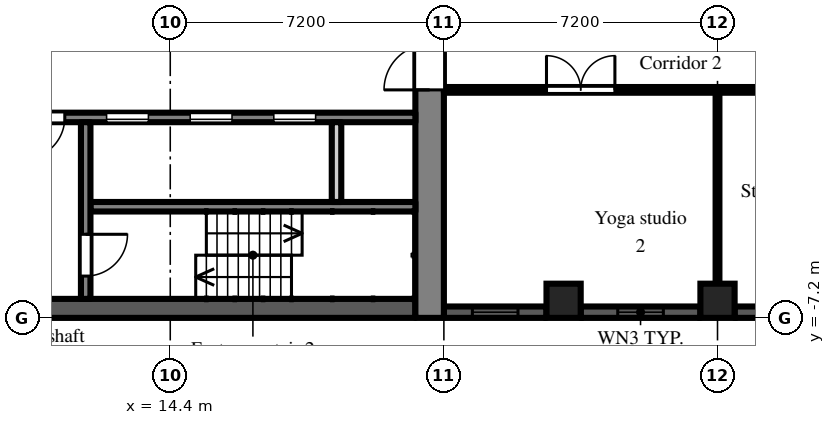
"""IFC4 building model, lengths in metres.
Left out: names, types, materials, properties, quantities, classifications, styles, units other than length and angle.
Written with IfcOpenShell. Run it as: python <this file> out.ifc"""

import sys

from ifc_helpers import new_model, si_unit, direction, frame, frame_2d, origin, origin_2d, place, context, subcontext, project, spatial, rectangle, extrude, element, fill, save


model = new_model("IFC4")
c1 = context("Model", 3, precision=1e-05, world=origin(), true_north=direction((0.0, 1.0)))
c2 = subcontext(c1, "Body", "Model", "MODEL_VIEW")
j1 = project(units=[si_unit("LENGTHUNIT", "METRE"), si_unit("PLANEANGLEUNIT", "RADIAN")], contexts=[c1])
p1 = place(None, origin())
s1 = spatial("IfcSite", under=j1, at=p1, CompositionType="ELEMENT")
p2 = place(p1, origin())
s2 = spatial("IfcBuilding", under=s1, at=p2, CompositionType="ELEMENT")
p3 = place(p2, frame((0.0, 0.0, 84.9)))
s3 = spatial("IfcBuildingStorey", under=s2, at=p3, CompositionType="ELEMENT", Elevation=84.9)
for number, where, z_axis, x_axis in (
    (1, (24.75, -6.75, 0.0), (0.0, 0.0, 1.0), (1.0, 0.0, 0.0)),
    (2, (28.8, -6.75, 0.0), (0.0, 0.0, 1.0), (1.0, 0.0, 0.0)),
):
    element("IfcColumn", number, at=place(p3, frame(where, z_axis=z_axis, x_axis=x_axis)), inside=s3, PredefinedType="COLUMN", context=c2, shape_type="SweptSolid", body=[
        extrude(rectangle(XDim=0.9, YDim=0.9, at=origin_2d()), origin(), (0.0, 0.0, 1.0), 3.0),
    ])
p4 = place(p3, frame((21.6, -7.05, 0.0), z_axis=(0.0, 0.0, 1.0), x_axis=(1.0, 0.0, 0.0)))
e3 = element("IfcWall", 3, at=p4, inside=s3, PredefinedType="SOLIDWALL", context=c2, shape_type="SweptSolid", body=[
    extrude(rectangle(XDim=2.7, YDim=0.3, at=frame_2d((1.35, 0.0))), origin(), (0.0, 0.0, 1.0), 2.1),
])
p5 = place(p4, frame((0.75, 0.0, 0.2)))
e4 = element("IfcOpeningElement", 4, at=p5, cuts=e3, PredefinedType="OPENING", context=c2, shape_type="SweptSolid", body=[
    extrude(rectangle(XDim=1.2, YDim=1.85, at=frame_2d((0.6, 0.925))), frame((0.0, 0.16, 0.0), z_axis=(0.0, -1.0, 0.0), x_axis=(1.0, 0.0, 0.0)), (0.0, 0.0, 1.0), 0.32),
])
p6 = place(p3, frame((25.2, -7.05, 0.0), z_axis=(0.0, 0.0, 1.0), x_axis=(1.0, 0.0, 0.0)))
e5 = element("IfcWall", 5, at=p6, inside=s3, PredefinedType="SOLIDWALL", context=c2, shape_type="SweptSolid", body=[
    extrude(rectangle(XDim=3.15, YDim=0.3, at=frame_2d((1.575, 0.0))), origin(), (0.0, 0.0, 1.0), 2.1),
])
p7 = place(p6, frame((0.975, 0.0, 0.2)))
e6 = element("IfcOpeningElement", 6, at=p7, cuts=e5, PredefinedType="OPENING", context=c2, shape_type="SweptSolid", body=[
    extrude(rectangle(XDim=1.2, YDim=1.85, at=frame_2d((0.6, 0.925))), frame((0.0, 0.16, 0.0), z_axis=(0.0, -1.0, 0.0), x_axis=(1.0, 0.0, 0.0)), (0.0, 0.0, 1.0), 0.32),
])
p8 = place(p3, frame((29.25, -7.05, 0.0), z_axis=(0.0, 0.0, 1.0), x_axis=(1.0, 0.0, 0.0)))
e7 = element("IfcWall", 7, at=p8, inside=s3, PredefinedType="SOLIDWALL", context=c2, shape_type="SweptSolid", body=[
    extrude(rectangle(XDim=6.3, YDim=0.3, at=frame_2d((3.15, 0.0))), origin(), (0.0, 0.0, 1.0), 2.1),
])
p9 = place(p8, frame((0.975, 0.0, 0.2)))
e8 = element("IfcOpeningElement", 8, at=p9, cuts=e7, PredefinedType="OPENING", context=c2, shape_type="SweptSolid", body=[
    extrude(rectangle(XDim=1.2, YDim=1.85, at=frame_2d((0.6, 0.925))), frame((0.0, 0.16, 0.0), z_axis=(0.0, -1.0, 0.0), x_axis=(1.0, 0.0, 0.0)), (0.0, 0.0, 1.0), 0.32),
])
p10 = place(p8, frame((4.125, 0.0, 0.2)))
e9 = element("IfcOpeningElement", 9, at=p10, cuts=e7, PredefinedType="OPENING", context=c2, shape_type="SweptSolid", body=[
    extrude(rectangle(XDim=1.2, YDim=1.85, at=frame_2d((0.6, 0.925))), frame((0.0, 0.16, 0.0), z_axis=(0.0, -1.0, 0.0), x_axis=(1.0, 0.0, 0.0)), (0.0, 0.0, 1.0), 0.32),
])
p11 = place(p3, frame((21.225, -7.2, 0.0), z_axis=(0.0, 0.0, 1.0), x_axis=(0.0, 1.0, 0.0)))
e10 = element("IfcWall", 10, at=p11, inside=s3, PredefinedType="SHEAR", context=c2, shape_type="SweptSolid", body=[
    extrude(rectangle(XDim=14.4, YDim=0.75, at=frame_2d((7.2, 0.0))), origin(), (0.0, 0.0, 1.0), 2.575),
])
p12 = place(p11, frame((6.0, 0.0, 0.0)))
e11 = element("IfcOpeningElement", 11, at=p12, cuts=e10, PredefinedType="OPENING", context=c2, shape_type="SweptSolid", body=[
    extrude(rectangle(XDim=2.4, YDim=2.2, at=frame_2d((1.2, 1.1))), frame((0.0, 0.385, 0.0), z_axis=(0.0, -1.0, 0.0), x_axis=(1.0, 0.0, 0.0)), (0.0, 0.0, 1.0), 0.77),
])
p13 = place(p3, frame((7.9, -6.95, 0.0), z_axis=(0.0, 0.0, 1.0), x_axis=(1.0, 0.0, 0.0)))
e12 = element("IfcWall", 12, at=p13, inside=s3, PredefinedType="SHEAR", context=c2, shape_type="SweptSolid", body=[
    extrude(rectangle(XDim=12.95, YDim=0.5, at=frame_2d((6.475, 0.0))), origin(), (0.0, 0.0, 1.0), 2.575),
])
p14 = place(p3, frame((7.9, -1.925, 0.0), z_axis=(0.0, 0.0, 1.0), x_axis=(1.0, 0.0, 0.0)))
e13 = element("IfcWall", 13, at=p14, inside=s3, PredefinedType="SHEAR", context=c2, shape_type="SweptSolid", body=[
    extrude(rectangle(XDim=12.95, YDim=0.25, at=frame_2d((6.475, 0.0))), origin(), (0.0, 0.0, 1.0), 2.575),
])
p15 = place(p14, frame((4.825, 0.0, 0.0)))
e14 = element("IfcOpeningElement", 14, at=p15, cuts=e13, PredefinedType="OPENING", context=c2, shape_type="SweptSolid", body=[
    extrude(rectangle(XDim=1.1, YDim=2.1, at=frame_2d((0.55, 1.05))), frame((0.0, 0.135, 0.0), z_axis=(0.0, -1.0, 0.0), x_axis=(1.0, 0.0, 0.0)), (0.0, 0.0, 1.0), 0.27),
])
p16 = place(p14, frame((7.025, 0.0, 0.0)))
e15 = element("IfcOpeningElement", 15, at=p16, cuts=e13, PredefinedType="OPENING", context=c2, shape_type="SweptSolid", body=[
    extrude(rectangle(XDim=1.1, YDim=2.1, at=frame_2d((0.55, 1.05))), frame((0.0, 0.135, 0.0), z_axis=(0.0, -1.0, 0.0), x_axis=(1.0, 0.0, 0.0)), (0.0, 0.0, 1.0), 0.27),
])
p17 = place(p14, frame((9.225, 0.0, 0.0)))
e16 = element("IfcOpeningElement", 16, at=p17, cuts=e13, PredefinedType="OPENING", context=c2, shape_type="SweptSolid", body=[
    extrude(rectangle(XDim=1.1, YDim=2.1, at=frame_2d((0.55, 1.05))), frame((0.0, 0.135, 0.0), z_axis=(0.0, -1.0, 0.0), x_axis=(1.0, 0.0, 0.0)), (0.0, 0.0, 1.0), 0.27),
])
p18 = place(p14, frame((0.525, 0.0, 0.0)))
e17 = element("IfcOpeningElement", 17, at=p18, cuts=e13, PredefinedType="OPENING", context=c2, shape_type="SweptSolid", body=[
    extrude(rectangle(XDim=0.9, YDim=2.1, at=frame_2d((0.45, 1.05))), frame((0.0, 0.135, 0.0), z_axis=(0.0, -1.0, 0.0), x_axis=(1.0, 0.0, 0.0)), (0.0, 0.0, 1.0), 0.27),
])
p19 = place(p14, frame((2.625, 0.0, 0.0)))
e18 = element("IfcOpeningElement", 18, at=p19, cuts=e13, PredefinedType="OPENING", context=c2, shape_type="SweptSolid", body=[
    extrude(rectangle(XDim=1.1, YDim=2.1, at=frame_2d((0.55, 1.05))), frame((0.0, 0.135, 0.0), z_axis=(0.0, -1.0, 0.0), x_axis=(1.0, 0.0, 0.0)), (0.0, 0.0, 1.0), 0.27),
])
p20 = place(p3, frame((12.3, -4.275, 0.0), z_axis=(0.0, 0.0, 1.0), x_axis=(1.0, 0.0, 0.0)))
e19 = element("IfcWall", 19, at=p20, inside=s3, PredefinedType="SHEAR", context=c2, shape_type="SweptSolid", body=[
    extrude(rectangle(XDim=8.55, YDim=0.25, at=frame_2d((4.275, 0.0))), origin(), (0.0, 0.0, 1.0), 2.575),
])
p21 = place(p3, frame((12.175, -2.05, 0.0), z_axis=(0.0, 0.0, 1.0), x_axis=(0.0, -1.0, 0.0)))
e20 = element("IfcWall", 20, at=p21, inside=s3, PredefinedType="SHEAR", context=c2, shape_type="SweptSolid", body=[
    extrude(rectangle(XDim=4.65, YDim=0.25, at=frame_2d((2.325, 0.0))), origin(), (0.0, 0.0, 1.0), 2.575),
])
p22 = place(p21, frame((2.95, 0.0, 0.0)))
e21 = element("IfcOpeningElement", 21, at=p22, cuts=e20, PredefinedType="OPENING", context=c2, shape_type="SweptSolid", body=[
    extrude(rectangle(XDim=1.1, YDim=2.1, at=frame_2d((0.55, 1.05))), frame((0.0, 0.135, 0.0), z_axis=(0.0, -1.0, 0.0), x_axis=(1.0, 0.0, 0.0)), (0.0, 0.0, 1.0), 0.27),
])
p23 = place(p3, frame((18.775, -2.05, 0.0), z_axis=(0.0, 0.0, 1.0), x_axis=(0.0, -1.0, 0.0)))
e22 = element("IfcWall", 22, at=p23, inside=s3, PredefinedType="PARTITIONING", context=c2, shape_type="SweptSolid", body=[
    extrude(rectangle(XDim=2.1, YDim=0.25, at=frame_2d((1.05, 0.0))), origin(), (0.0, 0.0, 1.0), 2.575),
])
p24 = place(p3, frame((21.6, -1.2, 0.0), z_axis=(0.0, 0.0, 1.0), x_axis=(1.0, 0.0, 0.0)))
e23 = element("IfcWall", 23, at=p24, inside=s3, PredefinedType="PARTITIONING", context=c2, shape_type="SweptSolid", body=[
    extrude(rectangle(XDim=14.9, YDim=0.15, at=frame_2d((7.45, 0.0))), origin(), (0.0, 0.0, 1.0), 2.575),
])
p25 = place(p24, frame((2.7, 0.0, 0.0)))
e24 = element("IfcOpeningElement", 24, at=p25, cuts=e23, PredefinedType="OPENING", context=c2, shape_type="SweptSolid", body=[
    extrude(rectangle(XDim=1.8, YDim=2.1, at=frame_2d((0.9, 1.05))), frame((0.0, 0.085, 0.0), z_axis=(0.0, -1.0, 0.0), x_axis=(1.0, 0.0, 0.0)), (0.0, 0.0, 1.0), 0.17),
])
p26 = place(p24, frame((8.55, 0.0, 0.0)))
e25 = element("IfcOpeningElement", 25, at=p26, cuts=e23, PredefinedType="OPENING", context=c2, shape_type="SweptSolid", body=[
    extrude(rectangle(XDim=0.9, YDim=2.1, at=frame_2d((0.45, 1.05))), frame((0.0, 0.085, 0.0), z_axis=(0.0, -1.0, 0.0), x_axis=(1.0, 0.0, 0.0)), (0.0, 0.0, 1.0), 0.17),
])
p27 = place(p24, frame((11.95, 0.0, 0.0)))
e26 = element("IfcOpeningElement", 26, at=p27, cuts=e23, PredefinedType="OPENING", context=c2, shape_type="SweptSolid", body=[
    extrude(rectangle(XDim=1.8, YDim=2.1, at=frame_2d((0.9, 1.05))), frame((0.0, 0.085, 0.0), z_axis=(0.0, -1.0, 0.0), x_axis=(1.0, 0.0, 0.0)), (0.0, 0.0, 1.0), 0.17),
])
p28 = place(p3, frame((28.8, -6.9, 0.0), z_axis=(0.0, 0.0, 1.0), x_axis=(0.0, 1.0, 0.0)))
e27 = element("IfcWall", 27, at=p28, inside=s3, PredefinedType="PARTITIONING", context=c2, shape_type="SweptSolid", body=[
    extrude(rectangle(XDim=5.625, YDim=0.1, at=frame_2d((2.812, 0.0))), origin(), (0.0, 0.0, 1.0), 2.575),
])
p29 = place(p5, origin())
e28 = element("IfcWindow", 28, at=p29, inside=s3, PartitioningType="SINGLE_PANEL", PredefinedType="WINDOW", context=c2, shape_type="SweptSolid", body=[
    extrude(rectangle(XDim=1.2, YDim=1.85, at=frame_2d((0.6, 0.925))), frame((0.0, 0.03, 0.0), z_axis=(0.0, -1.0, 0.0), x_axis=(1.0, 0.0, 0.0)), (0.0, 0.0, 1.0), 0.06),
])
fill(e4, e28)
p30 = place(p7, origin())
e29 = element("IfcWindow", 29, at=p30, inside=s3, PartitioningType="SINGLE_PANEL", PredefinedType="WINDOW", context=c2, shape_type="SweptSolid", body=[
    extrude(rectangle(XDim=1.2, YDim=1.85, at=frame_2d((0.6, 0.925))), frame((0.0, 0.03, 0.0), z_axis=(0.0, -1.0, 0.0), x_axis=(1.0, 0.0, 0.0)), (0.0, 0.0, 1.0), 0.06),
])
fill(e6, e29)
p31 = place(p15, origin())
e30 = element("IfcDoor", 30, at=p31, inside=s3, OperationType="SLIDING_TO_LEFT", PredefinedType="DOOR", context=c2, shape_type="SweptSolid", body=[
    extrude(rectangle(XDim=1.1, YDim=2.1, at=frame_2d((0.55, 1.05))), frame((0.0, 0.025, 0.0), z_axis=(0.0, -1.0, 0.0), x_axis=(1.0, 0.0, 0.0)), (0.0, 0.0, 1.0), 0.05),
])
fill(e14, e30)
p32 = place(p16, origin())
e31 = element("IfcDoor", 31, at=p32, inside=s3, OperationType="SLIDING_TO_LEFT", PredefinedType="DOOR", context=c2, shape_type="SweptSolid", body=[
    extrude(rectangle(XDim=1.1, YDim=2.1, at=frame_2d((0.55, 1.05))), frame((0.0, 0.025, 0.0), z_axis=(0.0, -1.0, 0.0), x_axis=(1.0, 0.0, 0.0)), (0.0, 0.0, 1.0), 0.05),
])
fill(e15, e31)
p33 = place(p17, origin())
e32 = element("IfcDoor", 32, at=p33, inside=s3, OperationType="SLIDING_TO_LEFT", PredefinedType="DOOR", context=c2, shape_type="SweptSolid", body=[
    extrude(rectangle(XDim=1.1, YDim=2.1, at=frame_2d((0.55, 1.05))), frame((0.0, 0.025, 0.0), z_axis=(0.0, -1.0, 0.0), x_axis=(1.0, 0.0, 0.0)), (0.0, 0.0, 1.0), 0.05),
])
fill(e16, e32)
p34 = place(p22, origin())
e33 = element("IfcDoor", 33, at=p34, inside=s3, OperationType="SINGLE_SWING_LEFT", PredefinedType="DOOR", context=c2, shape_type="SweptSolid", body=[
    extrude(rectangle(XDim=1.1, YDim=2.1, at=frame_2d((0.55, 1.05))), frame((0.0, 0.025, 0.0), z_axis=(0.0, -1.0, 0.0), x_axis=(1.0, 0.0, 0.0)), (0.0, 0.0, 1.0), 0.05),
])
fill(e21, e33)
p35 = place(p19, frame((1.1, 0.0, 0.0), z_axis=(0.0, 0.0, 1.0), x_axis=(-1.0, 0.0, 0.0)))
e34 = element("IfcDoor", 34, at=p35, inside=s3, OperationType="SINGLE_SWING_RIGHT", PredefinedType="DOOR", context=c2, shape_type="SweptSolid", body=[
    extrude(rectangle(XDim=1.1, YDim=2.1, at=frame_2d((0.55, 1.05))), frame((0.0, 0.025, 0.0), z_axis=(0.0, -1.0, 0.0), x_axis=(1.0, 0.0, 0.0)), (0.0, 0.0, 1.0), 0.05),
])
fill(e18, e34)
p36 = place(p12, origin())
e35 = element("IfcDoor", 35, at=p36, inside=s3, OperationType="DOUBLE_DOOR_DOUBLE_SWING", PredefinedType="DOOR", context=c2, shape_type="SweptSolid", body=[
    extrude(rectangle(XDim=2.4, YDim=2.2, at=frame_2d((1.2, 1.1))), frame((0.0, 0.025, 0.0), z_axis=(0.0, -1.0, 0.0), x_axis=(1.0, 0.0, 0.0)), (0.0, 0.0, 1.0), 0.05),
])
fill(e11, e35)
p37 = place(p25, origin())
e36 = element("IfcDoor", 36, at=p37, inside=s3, OperationType="DOUBLE_DOOR_DOUBLE_SWING", PredefinedType="DOOR", context=c2, shape_type="SweptSolid", body=[
    extrude(rectangle(XDim=1.8, YDim=2.1, at=frame_2d((0.9, 1.05))), frame((0.0, 0.025, 0.0), z_axis=(0.0, -1.0, 0.0), x_axis=(1.0, 0.0, 0.0)), (0.0, 0.0, 1.0), 0.05),
])
fill(e24, e36)
save(model, sys.argv[1])
